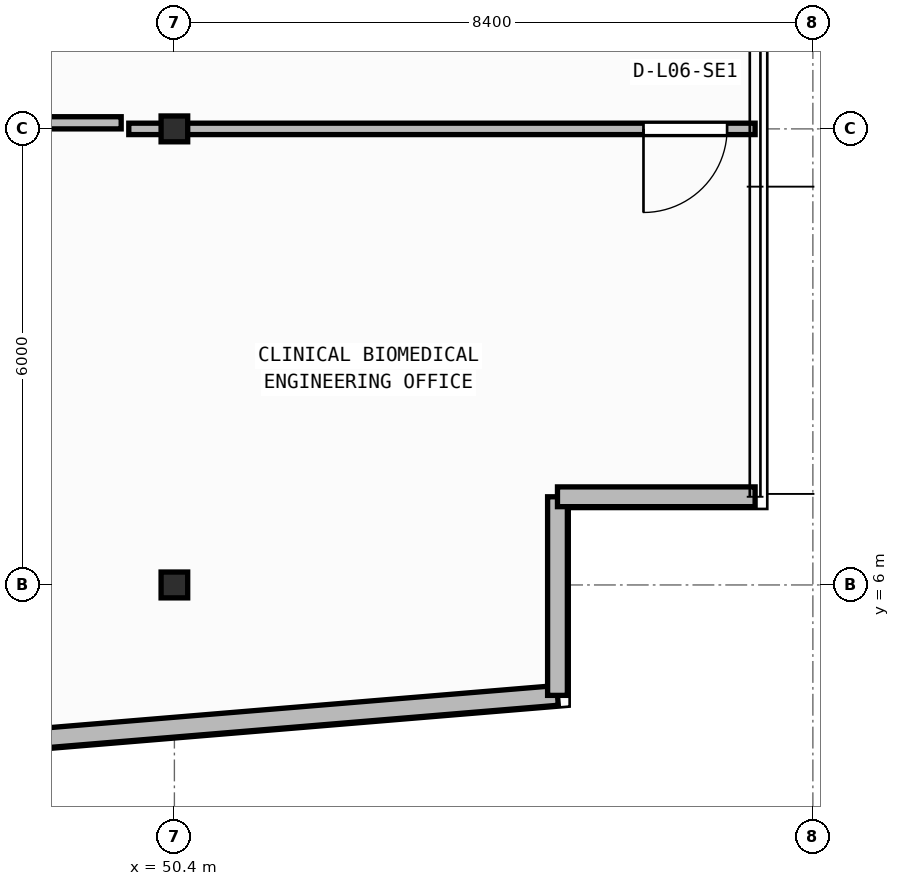
"""IFC4 building model, lengths in metres.
Left out: names, types, materials, properties, quantities, classifications, styles, units other than length and angle.
Written with IfcOpenShell. Run it as: python <this file> out.ifc"""

import sys

from ifc_helpers import new_model, si_unit, direction, frame, frame_2d, origin, origin_2d, place, context, subcontext, project, spatial, rectangle, i_section, extrude, element, fill, save


model = new_model("IFC4")
c1 = context("Model", 3, precision=1e-05, world=origin(), true_north=direction((0.0, 1.0)))
c2 = subcontext(c1, "Body", "Model", "MODEL_VIEW")
j1 = project(units=[si_unit("LENGTHUNIT", "METRE"), si_unit("PLANEANGLEUNIT", "RADIAN")], contexts=[c1])
p1 = place(None, origin())
s1 = spatial("IfcSite", under=j1, at=p1, CompositionType="ELEMENT")
p2 = place(p1, origin())
s2 = spatial("IfcBuilding", under=s1, at=p2, CompositionType="ELEMENT")
p3 = place(p2, frame((0.0, 0.0, 26.45)))
s3 = spatial("IfcBuildingStorey", under=s2, at=p3, CompositionType="ELEMENT", Elevation=26.45)
for number, where, z_axis, x_axis in (
    (1, (50.4, 6.0, 0.0), (0.0, 0.0, 1.0), (1.0, 0.0, 0.0)),
    (2, (50.4, 12.0, 0.0), (0.0, 0.0, 1.0), (1.0, 0.0, 0.0)),
):
    element("IfcColumn", number, at=place(p3, frame(where, z_axis=z_axis, x_axis=x_axis)), inside=s3, PredefinedType="COLUMN", context=c2, shape_type="SweptSolid", body=[
        extrude(i_section(OverallWidth=0.35, OverallDepth=0.34, WebThickness=0.016, FlangeThickness=0.028, at=origin_2d()), origin(), (0.0, 0.0, 1.0), 3.95),
    ])
p4 = place(p3, frame((2.76, 0.174, 0.0), z_axis=(0.0, 0.0, 1.0), x_axis=(0.996571478456, 0.082736257641, 0.0)))
e3 = element("IfcWall", 3, at=p4, inside=s3, PredefinedType="STANDARD", context=c2, shape_type="SweptSolid", body=[
    extrude(rectangle(XDim=52.861, YDim=0.26, at=frame_2d((26.431, 0.0))), origin(), (0.0, 0.0, 1.0), 3.71),
])
p5 = place(p4, frame((25.231, 0.0, 0.9)))
e4 = element("IfcOpeningElement", 4, at=p5, cuts=e3, PredefinedType="OPENING", context=c2, shape_type="SweptSolid", body=[
    extrude(rectangle(XDim=2.4, YDim=1.65, at=frame_2d((1.2, 0.825))), frame((0.0, 0.14, 0.0), z_axis=(0.0, -1.0, 0.0), x_axis=(1.0, 0.0, 0.0)), (0.0, 0.0, 1.0), 0.28),
])
p6 = place(p3, frame((55.44, 4.547, 0.0), z_axis=(0.0, 0.0, 1.0), x_axis=(0.0, 1.0, 0.0)))
e5 = element("IfcWall", 5, at=p6, inside=s3, PredefinedType="STANDARD", context=c2, shape_type="SweptSolid", body=[
    extrude(rectangle(XDim=2.613, YDim=0.26, at=frame_2d((1.306, 0.0))), origin(), (0.0, 0.0, 1.0), 3.71),
])
p7 = place(p3, frame((55.44, 7.16, 0.0), z_axis=(0.0, 0.0, 1.0), x_axis=(1.0, 0.0, 0.0)))
e6 = element("IfcWall", 6, at=p7, inside=s3, PredefinedType="STANDARD", context=c2, shape_type="SweptSolid", body=[
    extrude(rectangle(XDim=2.6, YDim=0.26, at=frame_2d((1.3, 0.0))), origin(), (0.0, 0.0, 1.0), 3.71),
])
p8 = place(p3, frame((58.04, 12.0, 0.0), z_axis=(0.0, 0.0, 1.0), x_axis=(-1.0, 0.0, 0.0)))
e7 = element("IfcWall", 7, at=p8, inside=s3, PredefinedType="PARTITIONING", context=c2, shape_type="SweptSolid", body=[
    extrude(rectangle(XDim=8.24, YDim=0.15, at=frame_2d((4.12, 0.0))), origin(), (0.0, 0.0, 1.0), 3.073),
])
p9 = place(p8, frame((0.368, 0.0, 0.0)))
e8 = element("IfcOpeningElement", 8, at=p9, cuts=e7, PredefinedType="OPENING", context=c2, shape_type="SweptSolid", body=[
    extrude(rectangle(XDim=1.1, YDim=2.1, at=frame_2d((0.55, 1.05))), frame((0.0, 0.085, 0.0), z_axis=(0.0, -1.0, 0.0), x_axis=(1.0, 0.0, 0.0)), (0.0, 0.0, 1.0), 0.17),
])
p10 = place(p3, frame((46.689, 12.08, 0.0), z_axis=(0.0, 0.0, 1.0), x_axis=(1.0, 0.0, 0.0)))
e9 = element("IfcWall", 9, at=p10, inside=s3, PredefinedType="PARTITIONING", context=c2, shape_type="SweptSolid", body=[
    extrude(rectangle(XDim=3.011, YDim=0.16, at=frame_2d((1.505, 0.0))), origin(), (0.0, 0.0, 1.0), 3.073),
])
p11 = place(p9, origin())
e10 = element("IfcDoor", 10, at=p11, inside=s3, OperationType="SINGLE_SWING_RIGHT", PredefinedType="DOOR", context=c2, shape_type="SweptSolid", body=[
    extrude(rectangle(XDim=1.1, YDim=2.1, at=frame_2d((0.55, 1.05))), frame((0.0, 0.025, 0.0), z_axis=(0.0, -1.0, 0.0), x_axis=(1.0, 0.0, 0.0)), (0.0, 0.0, 1.0), 0.05),
])
fill(e8, e10)
save(model, sys.argv[1])
